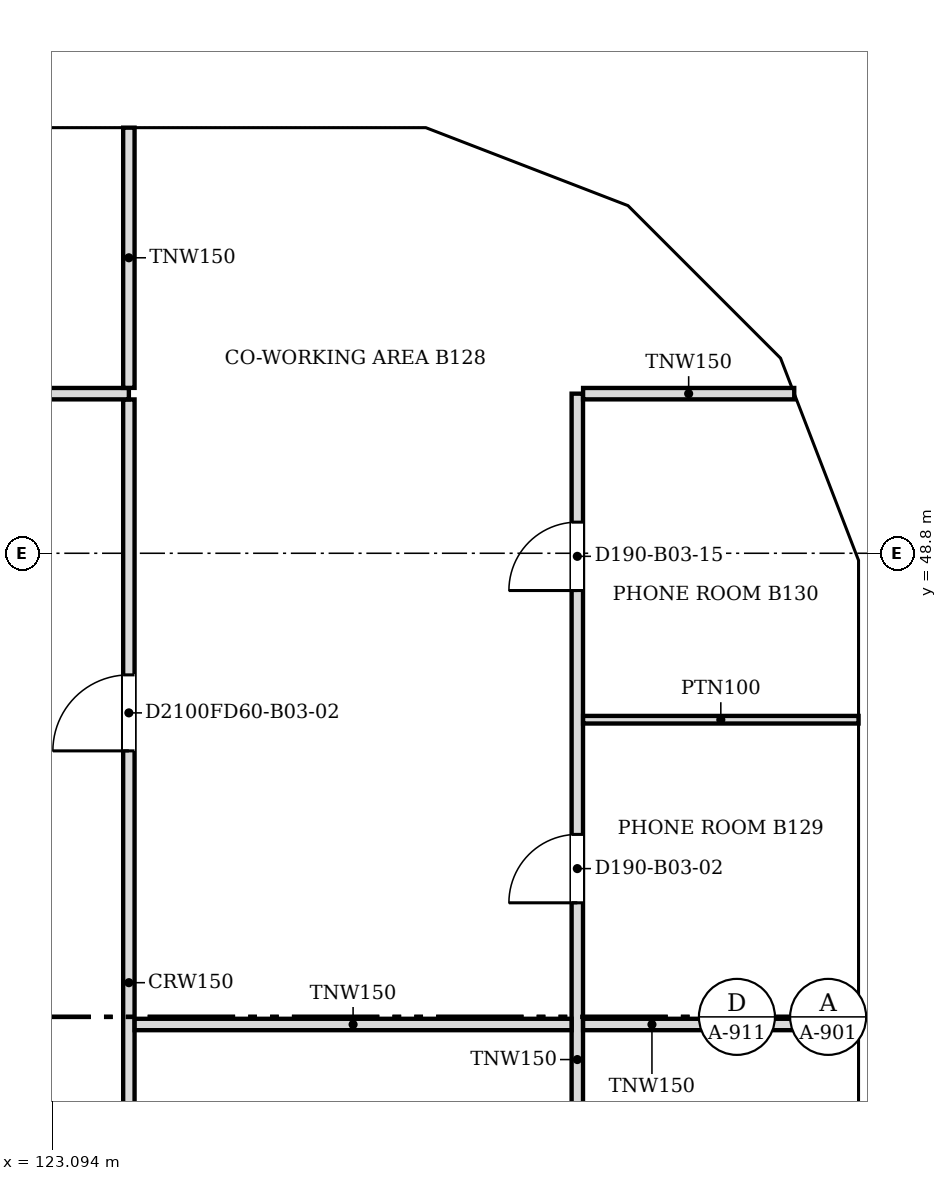
"""IFC4 building model, lengths in metres.
Left out: names, types, materials, properties, quantities, classifications, styles, units other than length and angle.
Written with IfcOpenShell. Run it as: python <this file> out.ifc"""

import sys

from ifc_helpers import new_model, si_unit, direction, frame, frame_2d, origin, place, context, subcontext, project, spatial, polyline, rectangle, outline, extrude, faceted_brep, source, transform, mapped, element, fill, save


model = new_model("IFC4")
c1 = context("Model", 3, precision=1e-05, world=origin(), true_north=direction((0.0, 1.0)))
c2 = subcontext(c1, "Body", "Model", "MODEL_VIEW")
j1 = project(units=[si_unit("LENGTHUNIT", "METRE"), si_unit("PLANEANGLEUNIT", "RADIAN")], contexts=[c1])
p1 = place(None, origin())
s1 = spatial("IfcSite", under=j1, at=p1, CompositionType="ELEMENT")
p2 = place(p1, origin())
s2 = spatial("IfcBuilding", under=s1, at=p2, CompositionType="ELEMENT")
p3 = place(p2, frame((0.0, 0.0, 25.8)))
s3 = spatial("IfcBuildingStorey", under=s2, at=p3, CompositionType="ELEMENT", Elevation=25.8)
m1 = source(origin(), c2, "Body", "Brep", [
    faceted_brep([(6.1, -0.25, 0.0), (3.05, -0.25, 3.8), (0.0, -0.25, 0.0), (6.1, -0.25, 0.0), (0.0, 0.25, 0.0), (3.05, 0.25, 3.8), (6.1, 0.25, 0.0), (6.1, 0.25, 0.0)], [[[0, 1, 2, 3]], [[4, 5, 6, 7]], [[6, 5, 1, 0]], [[5, 4, 2, 1]], [[4, 7, 3, 2]], [[3, 7, 6, 0]]]),
])
p4 = place(p3, frame((133.95, 36.6, 0.0), z_axis=(0.0, 0.0, 1.0), x_axis=(0.0, 1.0, 0.0)))
e1 = element("IfcWall", 1, at=p4, inside=s3, PredefinedType="SOLIDWALL", context=c2, shape_type="MappedRepresentation", body=[
    mapped(m1, transform((0.0, 0.0, 0.0), scale=1.0)),
])
m2 = source(origin(), c2, "Body", "SweptSolid", [
    extrude(outline(polyline([(5.579, 0.25), (3.05, 3.401), (0.521, 0.25), (5.579, 0.25)])), frame((0.0, 0.26, 0.0), z_axis=(0.0, -1.0, 0.0), x_axis=(1.0, 0.0, 0.0)), (0.0, 0.0, 1.0), 0.52),
])
p5 = place(p4, origin())
e2 = element("IfcOpeningElement", 2, at=p5, cuts=e1, PredefinedType="OPENING", context=c2, shape_type="MappedRepresentation", body=[
    mapped(m2, transform((0.0, 0.0, 0.0), scale=1.0)),
])
m3 = source(origin(), c2, "Body", "Brep", [
    faceted_brep([(6.053, -0.25, 0.0), (3.05, -0.25, 3.8), (0.0, -0.25, 0.0), (0.0, 0.25, 0.0), (3.05, 0.25, 3.8), (6.007, 0.25, 0.059), (6.007, 0.25, 0.0), (6.053, 0.0, 0.0)], [[[0, 1, 2]], [[3, 4, 5, 6]], [[5, 4, 1, 0, 7]], [[4, 3, 2, 1]], [[3, 6, 7, 0, 2]], [[7, 6, 5]]]),
])
p6 = place(p3, frame((133.95, 42.7, 0.0), z_axis=(0.0, 0.0, 1.0), x_axis=(0.0, 1.0, 0.0)))
e3 = element("IfcWall", 3, at=p6, inside=s3, PredefinedType="SOLIDWALL", context=c2, shape_type="MappedRepresentation", body=[
    mapped(m3, transform((0.0, 0.0, 0.0), scale=1.0)),
])
m4 = source(origin(), c2, "Body", "SweptSolid", [
    extrude(outline(polyline([(5.537, 0.25), (3.049, 3.399), (0.521, 0.25), (5.537, 0.25)])), frame((0.0, 0.26, 0.0), z_axis=(0.0, -1.0, 0.0), x_axis=(1.0, 0.0, 0.0)), (0.0, 0.0, 1.0), 0.52),
])
p7 = place(p6, origin())
e4 = element("IfcOpeningElement", 4, at=p7, cuts=e3, PredefinedType="OPENING", context=c2, shape_type="MappedRepresentation", body=[
    mapped(m4, transform((0.0, 0.0, 0.0), scale=1.0)),
])
m5 = source(origin(), c2, "Body", "Brep", [
    faceted_brep([(3.003, -0.25, 3.732), (2.95, -0.25, 3.8), (0.0, -0.25, 0.0), (3.003, -0.25, 0.0), (0.047, 0.25, 0.06), (2.898, 0.25, 3.732), (2.898, 0.25, 0.0), (0.047, 0.25, 0.0), (2.95, 0.0, 3.8), (0.0, 0.0, 0.0)], [[[0, 1, 2, 3]], [[4, 5, 6, 7]], [[8, 1, 0]], [[5, 4, 9, 2, 1, 8]], [[7, 6, 3, 2, 9]], [[7, 9, 4]], [[3, 6, 5, 8, 0]]]),
])
p8 = place(p3, frame((133.95, 48.753, 0.0), z_axis=(0.0, 0.0, 1.0), x_axis=(-0.359855894603, 0.933007896601, 0.0)))
e5 = element("IfcWall", 5, at=p8, inside=s3, PredefinedType="SOLIDWALL", context=c2, shape_type="MappedRepresentation", body=[
    mapped(m5, transform((0.0, 0.0, 0.0), scale=1.0)),
])
m6 = source(origin(), c2, "Body", "SweptSolid", [
    extrude(outline(polyline([(2.75, 3.135), (0.511, 0.25), (2.75, 0.25), (2.75, 3.135)])), frame((0.0, 0.26, 0.0), z_axis=(0.0, -1.0, 0.0), x_axis=(1.0, 0.0, 0.0)), (0.0, 0.0, 1.0), 0.52),
])
p9 = place(p8, origin())
e6 = element("IfcOpeningElement", 6, at=p9, cuts=e5, PredefinedType="OPENING", context=c2, shape_type="MappedRepresentation", body=[
    mapped(m6, transform((0.0, 0.0, 0.0), scale=1.0)),
])
m7 = source(origin(), c2, "Body", "Brep", [
    faceted_brep([(2.997, -0.25, 0.0), (0.053, -0.25, 3.8), (0.0, -0.25, 3.732), (0.0, -0.25, 0.0), (0.106, 0.25, 3.732), (2.944, 0.25, 0.068), (2.944, 0.25, 0.0), (0.106, 0.25, 0.0), (0.053, 0.0, 3.8), (2.997, 0.0, 0.0)], [[[0, 1, 2, 3]], [[4, 5, 6, 7]], [[5, 4, 8, 1, 0, 9]], [[2, 1, 8]], [[7, 6, 9, 0, 3]], [[7, 3, 2, 8, 4]], [[9, 6, 5]]]),
])
p10 = place(p3, frame((132.926, 51.469, 0.0), z_axis=(0.0, 0.0, 1.0), x_axis=(-0.707066050402, 0.707147509625, 0.0)))
e7 = element("IfcWall", 7, at=p10, inside=s3, PredefinedType="SOLIDWALL", context=c2, shape_type="MappedRepresentation", body=[
    mapped(m7, transform((0.0, 0.0, 0.0), scale=1.0)),
])
m8 = source(origin(), c2, "Body", "SweptSolid", [
    extrude(outline(polyline([(2.487, 0.25), (0.253, 3.134), (0.253, 0.25), (2.487, 0.25)])), frame((0.0, 0.26, 0.0), z_axis=(0.0, -1.0, 0.0), x_axis=(1.0, 0.0, 0.0)), (0.0, 0.0, 1.0), 0.52),
])
p11 = place(p10, origin())
e8 = element("IfcOpeningElement", 8, at=p11, cuts=e7, PredefinedType="OPENING", context=c2, shape_type="MappedRepresentation", body=[
    mapped(m8, transform((0.0, 0.0, 0.0), scale=1.0)),
])
m9 = source(origin(), c2, "Body", "Brep", [
    faceted_brep([(2.997, -0.25, 3.741), (2.95, -0.25, 3.8), (0.0, -0.25, 0.0), (2.997, -0.25, 0.0), (0.053, 0.25, 0.068), (2.904, 0.25, 3.74), (2.904, 0.25, 0.0), (0.053, 0.25, 0.0), (2.95, 0.0, 3.8), (0.0, 0.0, 0.0)], [[[0, 1, 2, 3]], [[4, 5, 6, 7]], [[8, 1, 0]], [[5, 4, 9, 2, 1, 8]], [[7, 6, 3, 2, 9]], [[7, 9, 4]], [[3, 6, 5, 8, 0]]]),
])
p12 = place(p3, frame((130.806, 53.588, 0.0), z_axis=(0.0, 0.0, 1.0), x_axis=(-0.932990326376, 0.359901446078, 0.0)))
e9 = element("IfcWall", 9, at=p12, inside=s3, PredefinedType="SOLIDWALL", context=c2, shape_type="MappedRepresentation", body=[
    mapped(m9, transform((0.0, 0.0, 0.0), scale=1.0)),
])
p13 = place(p12, origin())
e10 = element("IfcOpeningElement", 10, at=p13, cuts=e9, PredefinedType="OPENING", context=c2, shape_type="MappedRepresentation", body=[
    mapped(m6, transform((0.0, 0.0, 0.0), scale=1.0)),
])
m10 = source(origin(), c2, "Body", "Brep", [
    faceted_brep([(3.05, -0.25, 0.0), (0.047, -0.25, 3.8), (0.0, -0.25, 3.74), (0.0, -0.25, 0.0), (0.093, 0.25, 3.741), (3.05, 0.25, 0.0), (0.093, 0.25, 0.0), (0.047, 0.0, 3.8)], [[[0, 1, 2, 3]], [[4, 5, 6]], [[5, 4, 7, 1, 0]], [[2, 1, 7]], [[6, 5, 0, 3]], [[6, 3, 2, 7, 4]]]),
])
p14 = place(p3, frame((128.1, 54.65, 0.0), z_axis=(0.0, 0.0, 1.0), x_axis=(-1.0, 0.0, 0.0)))
e11 = element("IfcWall", 11, at=p14, inside=s3, PredefinedType="SOLIDWALL", context=c2, shape_type="MappedRepresentation", body=[
    mapped(m10, transform((0.0, 0.0, 0.0), scale=1.0)),
])
m11 = source(origin(), c2, "Body", "SweptSolid", [
    extrude(outline(polyline([(2.534, 0.25), (0.247, 3.144), (0.247, 0.25), (2.534, 0.25)])), frame((0.0, 0.26, 0.0), z_axis=(0.0, -1.0, 0.0), x_axis=(1.0, 0.0, 0.0)), (0.0, 0.0, 1.0), 0.52),
])
p15 = place(p14, origin())
e12 = element("IfcOpeningElement", 12, at=p15, cuts=e11, PredefinedType="OPENING", context=c2, shape_type="MappedRepresentation", body=[
    mapped(m11, transform((0.0, 0.0, 0.0), scale=1.0)),
])
m12 = source(origin(), c2, "Body", "SweptSolid", [
    extrude(outline(polyline([(6.1, 0.0), (3.05, 3.8), (0.0, 0.0), (6.1, 0.0)])), frame((0.0, 0.25, 0.0), z_axis=(0.0, -1.0, 0.0), x_axis=(1.0, 0.0, 0.0)), (0.0, 0.0, 1.0), 0.5),
])
p16 = place(p3, frame((125.05, 54.65, 0.0), z_axis=(0.0, 0.0, 1.0), x_axis=(-1.0, 0.0, 0.0)))
e13 = element("IfcWall", 13, at=p16, inside=s3, PredefinedType="SOLIDWALL", context=c2, shape_type="MappedRepresentation", body=[
    mapped(m12, transform((0.0, 0.0, 0.0), scale=1.0)),
])
p17 = place(p16, origin())
e14 = element("IfcOpeningElement", 14, at=p17, cuts=e13, PredefinedType="OPENING", context=c2, shape_type="MappedRepresentation", body=[
    mapped(m2, transform((0.0, 0.0, 0.0), scale=1.0)),
])
p18 = place(p2, frame((0.0, 0.0, 29.6)))
s4 = spatial("IfcBuildingStorey", under=s2, at=p18, CompositionType="ELEMENT", Elevation=29.6)
m13 = source(origin(), c2, "Body", "SweptSolid", [
    extrude(outline(polyline([(3.05, 0.0), (6.1, 3.8), (3.05, 7.6), (0.0, 3.8), (3.05, 0.0)])), frame((0.0, 0.25, 0.0), z_axis=(0.0, -1.0, 0.0), x_axis=(1.0, 0.0, 0.0)), (0.0, 0.0, 1.0), 0.5),
])
p19 = place(p18, frame((133.95, 39.65, -3.8), z_axis=(0.0, 0.0, 1.0), x_axis=(0.0, 1.0, 0.0)))
e15 = element("IfcWall", 15, at=p19, inside=s4, PredefinedType="SOLIDWALL", context=c2, shape_type="MappedRepresentation", body=[
    mapped(m13, transform((0.0, 0.0, 0.0), scale=1.0)),
])
m14 = source(origin(), c2, "Body", "SweptSolid", [
    extrude(outline(polyline([(3.05, 0.399), (5.78, 3.8), (3.05, 7.2), (0.321, 3.8), (3.05, 0.399)])), frame((0.0, 0.26, 0.0), z_axis=(0.0, -1.0, 0.0), x_axis=(1.0, 0.0, 0.0)), (0.0, 0.0, 1.0), 0.52),
])
p20 = place(p19, origin())
e16 = element("IfcOpeningElement", 16, at=p20, cuts=e15, PredefinedType="OPENING", context=c2, shape_type="MappedRepresentation", body=[
    mapped(m14, transform((0.0, 0.0, 0.0), scale=1.0)),
])
m15 = source(origin(), c2, "Body", "Brep", [
    faceted_brep([(3.003, -0.25, 0.0), (3.05, -0.25, 0.06), (3.05, -0.25, 7.54), (3.003, -0.25, 7.6), (0.0, -0.25, 3.8), (0.0, 0.25, 3.8), (2.957, 0.25, 7.541), (2.957, 0.25, 0.059), (3.003, 0.0, 0.0), (3.003, 0.0, 7.6)], [[[0, 1, 2, 3, 4]], [[5, 6, 7]], [[1, 0, 8]], [[9, 3, 2]], [[6, 5, 4, 3, 9]], [[5, 7, 8, 0, 4]], [[1, 8, 7, 6, 9, 2]]]),
])
p21 = place(p18, frame((133.95, 45.75, -3.8), z_axis=(0.0, 0.0, 1.0), x_axis=(0.0, 1.0, 0.0)))
e17 = element("IfcWall", 17, at=p21, inside=s4, PredefinedType="SOLIDWALL", context=c2, shape_type="MappedRepresentation", body=[
    mapped(m15, transform((0.0, 0.0, 0.0), scale=1.0)),
])
m16 = source(origin(), c2, "Body", "SweptSolid", [
    extrude(outline(polyline([(2.803, 6.944), (0.319, 3.8), (2.803, 0.656), (2.803, 6.944)])), frame((0.0, 0.26, 0.0), z_axis=(0.0, -1.0, 0.0), x_axis=(1.0, 0.0, 0.0)), (0.0, 0.0, 1.0), 0.52),
])
p22 = place(p21, origin())
e18 = element("IfcOpeningElement", 18, at=p22, cuts=e17, PredefinedType="OPENING", context=c2, shape_type="MappedRepresentation", body=[
    mapped(m16, transform((0.0, 0.0, 0.0), scale=1.0)),
])
m17 = source(origin(), c2, "Body", "Brep", [
    faceted_brep([(0.047, -0.25, 0.0), (2.997, -0.25, 3.8), (0.047, -0.25, 7.6), (0.0, -0.25, 7.541), (0.0, -0.25, 0.059), (0.093, 0.25, 7.54), (2.944, 0.25, 3.868), (2.944, 0.25, 3.732), (0.093, 0.25, 0.06), (2.997, 0.0, 3.8), (0.047, 0.0, 0.0), (0.047, 0.0, 7.6)], [[[0, 1, 2, 3, 4]], [[5, 6, 7, 8]], [[8, 7, 9, 1, 0, 10]], [[6, 5, 11, 2, 1, 9]], [[3, 2, 11]], [[10, 0, 4]], [[8, 10, 4, 3, 11, 5]], [[7, 6, 9]]]),
])
p23 = place(p18, frame((133.967, 48.71, -3.8), z_axis=(0.0, 0.0, 1.0), x_axis=(-0.359901446078, 0.932990326376, 0.0)))
e19 = element("IfcWall", 19, at=p23, inside=s4, PredefinedType="SOLIDWALL", context=c2, shape_type="MappedRepresentation", body=[
    mapped(m17, transform((0.0, 0.0, 0.0), scale=1.0)),
])
m18 = source(origin(), c2, "Body", "SweptSolid", [
    extrude(outline(polyline([(0.247, 0.665), (2.681, 3.8), (0.247, 6.935), (0.247, 0.665)])), frame((0.0, 0.26, 0.0), z_axis=(0.0, -1.0, 0.0), x_axis=(1.0, 0.0, 0.0)), (0.0, 0.0, 1.0), 0.52),
])
p24 = place(p23, origin())
e20 = element("IfcOpeningElement", 20, at=p24, cuts=e19, PredefinedType="OPENING", context=c2, shape_type="MappedRepresentation", body=[
    mapped(m18, transform((0.0, 0.0, 0.0), scale=1.0)),
])
m19 = source(origin(), c2, "Body", "Brep", [
    faceted_brep([(2.944, -0.25, 0.0), (2.997, -0.25, 0.068), (2.997, -0.25, 7.532), (2.944, -0.25, 7.6), (0.0, -0.25, 3.8), (0.053, 0.25, 3.868), (2.891, 0.25, 7.532), (2.891, 0.25, 0.068), (0.053, 0.25, 3.732), (2.944, 0.0, 0.0), (2.944, 0.0, 7.6), (0.0, 0.0, 3.8)], [[[0, 1, 2, 3, 4]], [[5, 6, 7, 8]], [[1, 0, 9]], [[10, 3, 2]], [[6, 5, 11, 4, 3, 10]], [[8, 7, 9, 0, 4, 11]], [[8, 11, 5]], [[1, 9, 7, 6, 10, 2]]]),
])
p25 = place(p18, frame((132.888, 51.506, -3.8), z_axis=(0.0, 0.0, 1.0), x_axis=(-0.707147509625, 0.707066050402, 0.0)))
e21 = element("IfcWall", 21, at=p25, inside=s4, PredefinedType="SOLIDWALL", context=c2, shape_type="MappedRepresentation", body=[
    mapped(m19, transform((0.0, 0.0, 0.0), scale=1.0)),
])
m20 = source(origin(), c2, "Body", "SweptSolid", [
    extrude(outline(polyline([(2.744, 6.934), (0.316, 3.8), (2.744, 0.666), (2.744, 6.934)])), frame((0.0, 0.26, 0.0), z_axis=(0.0, -1.0, 0.0), x_axis=(1.0, 0.0, 0.0)), (0.0, 0.0, 1.0), 0.52),
])
p26 = place(p25, origin())
e22 = element("IfcOpeningElement", 22, at=p26, cuts=e21, PredefinedType="OPENING", context=c2, shape_type="MappedRepresentation", body=[
    mapped(m20, transform((0.0, 0.0, 0.0), scale=1.0)),
])
m21 = source(origin(), c2, "Body", "Brep", [
    faceted_brep([(0.053, -0.25, 0.0), (3.003, -0.25, 3.8), (0.053, -0.25, 7.6), (0.0, -0.25, 7.531), (0.0, -0.25, 0.068), (0.106, 0.25, 7.532), (2.957, 0.25, 3.86), (2.957, 0.25, 3.74), (0.106, 0.25, 0.068), (3.003, 0.0, 3.8), (0.053, 0.0, 0.0), (0.053, 0.0, 7.6)], [[[0, 1, 2, 3, 4]], [[5, 6, 7, 8]], [[8, 7, 9, 1, 0, 10]], [[6, 5, 11, 2, 1, 9]], [[3, 2, 11]], [[10, 0, 4]], [[8, 10, 4, 3, 11, 5]], [[7, 6, 9]]]),
])
p27 = place(p18, frame((130.856, 53.569, -3.8), z_axis=(0.0, 0.0, 1.0), x_axis=(-0.933007896601, 0.359855894603, 0.0)))
e23 = element("IfcWall", 23, at=p27, inside=s4, PredefinedType="SOLIDWALL", context=c2, shape_type="MappedRepresentation", body=[
    mapped(m21, transform((0.0, 0.0, 0.0), scale=1.0)),
])
m22 = source(origin(), c2, "Body", "SweptSolid", [
    extrude(outline(polyline([(0.253, 0.665), (2.687, 3.8), (0.253, 6.935), (0.253, 0.665)])), frame((0.0, 0.26, 0.0), z_axis=(0.0, -1.0, 0.0), x_axis=(1.0, 0.0, 0.0)), (0.0, 0.0, 1.0), 0.52),
])
p28 = place(p27, origin())
e24 = element("IfcOpeningElement", 24, at=p28, cuts=e23, PredefinedType="OPENING", context=c2, shape_type="MappedRepresentation", body=[
    mapped(m22, transform((0.0, 0.0, 0.0), scale=1.0)),
])
m23 = source(origin(), c2, "Body", "Brep", [
    faceted_brep([(3.003, -0.25, 0.0), (6.053, -0.25, 3.8), (3.003, -0.25, 7.6), (0.0, -0.25, 3.8), (0.047, 0.25, 3.859), (3.003, 0.25, 7.6), (6.053, 0.25, 3.8), (3.003, 0.25, 0.0), (0.047, 0.25, 3.741), (0.0, 0.0, 3.8)], [[[0, 1, 2, 3]], [[4, 5, 6, 7, 8]], [[7, 6, 1, 0]], [[6, 5, 2, 1]], [[5, 4, 9, 3, 2]], [[8, 7, 0, 3, 9]], [[8, 9, 4]]]),
])
p29 = place(p18, frame((128.053, 54.65, -3.8), z_axis=(0.0, 0.0, 1.0), x_axis=(-1.0, 0.0, 0.0)))
e25 = element("IfcWall", 25, at=p29, inside=s4, PredefinedType="SOLIDWALL", context=c2, shape_type="MappedRepresentation", body=[
    mapped(m23, transform((0.0, 0.0, 0.0), scale=1.0)),
])
m24 = source(origin(), c2, "Body", "SweptSolid", [
    extrude(outline(polyline([(3.005, 0.401), (5.733, 3.8), (3.005, 7.199), (0.319, 3.8), (3.005, 0.401)])), frame((0.0, 0.26, 0.0), z_axis=(0.0, -1.0, 0.0), x_axis=(1.0, 0.0, 0.0)), (0.0, 0.0, 1.0), 0.52),
])
p30 = place(p29, origin())
e26 = element("IfcOpeningElement", 26, at=p30, cuts=e25, PredefinedType="OPENING", context=c2, shape_type="MappedRepresentation", body=[
    mapped(m24, transform((0.0, 0.0, 0.0), scale=1.0)),
])
p31 = place(p3, frame((124.1, 50.824, 0.0), z_axis=(0.0, 0.0, 1.0), x_axis=(0.0, -1.0, 0.0)))
e27 = element("IfcWall", 27, at=p31, inside=s3, PredefinedType="PARTITIONING", context=c2, shape_type="SweptSolid", body=[
    extrude(rectangle(XDim=14.224, YDim=0.15, at=frame_2d((7.112, 0.0))), origin(), (0.0, 0.0, 1.0), 3.067),
])
m25 = source(origin(), c2, "Body", "SweptSolid", [
    extrude(rectangle(XDim=1.0, YDim=2.1, at=frame_2d((0.5, 1.05))), frame((0.0, 0.085, 0.0), z_axis=(0.0, -1.0, 0.0), x_axis=(1.0, 0.0, 0.0)), (0.0, 0.0, 1.0), 0.17),
])
p32 = place(p31, frame((3.624, 0.0, 0.0)))
e28 = element("IfcOpeningElement", 28, at=p32, cuts=e27, PredefinedType="OPENING", context=c2, shape_type="MappedRepresentation", body=[
    mapped(m25, transform((0.0, 0.0, 0.0), scale=1.0)),
])
p33 = place(p31, frame((10.724, 0.0, 0.0)))
e29 = element("IfcOpeningElement", 29, at=p33, cuts=e27, PredefinedType="OPENING", context=c2, shape_type="MappedRepresentation", body=[
    mapped(m25, transform((0.0, 0.0, 0.0), scale=1.0)),
])
p34 = place(p3, frame((130.0, 50.9, 0.0), z_axis=(0.0, 0.0, 1.0), x_axis=(0.0, -1.0, 0.0)))
e30 = element("IfcWall", 30, at=p34, inside=s3, PredefinedType="PARTITIONING", context=c2, shape_type="SweptSolid", body=[
    extrude(rectangle(XDim=14.224, YDim=0.15, at=frame_2d((7.112, 0.0))), origin(), (0.0, 0.0, 1.0), 3.067),
])
m26 = source(origin(), c2, "Body", "SweptSolid", [
    extrude(rectangle(XDim=0.9, YDim=2.1, at=frame_2d((0.45, 1.05))), frame((0.0, 0.085, 0.0), z_axis=(0.0, -1.0, 0.0), x_axis=(1.0, 0.0, 0.0)), (0.0, 0.0, 1.0), 0.17),
])
p35 = place(p34, frame((5.799, 0.0, 0.0)))
e31 = element("IfcOpeningElement", 31, at=p35, cuts=e30, PredefinedType="OPENING", context=c2, shape_type="MappedRepresentation", body=[
    mapped(m26, transform((0.0, 0.0, 0.0), scale=1.0)),
])
p36 = place(p34, frame((10.824, 0.0, 0.0)))
e32 = element("IfcOpeningElement", 32, at=p36, cuts=e30, PredefinedType="OPENING", context=c2, shape_type="MappedRepresentation", body=[
    mapped(m26, transform((0.0, 0.0, 0.0), scale=1.0)),
])
p37 = place(p34, frame((1.69, 0.0, 0.0)))
e33 = element("IfcOpeningElement", 33, at=p37, cuts=e30, PredefinedType="OPENING", context=c2, shape_type="MappedRepresentation", body=[
    mapped(m26, transform((0.0, 0.0, 0.0), scale=1.0)),
])
p38 = place(p3, frame((124.176, 42.6, 0.0), z_axis=(0.0, 0.0, 1.0), x_axis=(1.0, 0.0, 0.0)))
e34 = element("IfcWall", 34, at=p38, inside=s3, PredefinedType="PARTITIONING", context=c2, shape_type="SweptSolid", body=[
    extrude(rectangle(XDim=5.748, YDim=0.15, at=frame_2d((2.874, 0.0))), origin(), (0.0, 0.0, 1.0), 3.067),
])
p39 = place(p3, frame((130.076, 42.6, 0.0), z_axis=(0.0, 0.0, 1.0), x_axis=(1.0, 0.0, 0.0)))
e35 = element("IfcWall", 35, at=p39, inside=s3, PredefinedType="PARTITIONING", context=c2, shape_type="SweptSolid", body=[
    extrude(rectangle(XDim=3.624, YDim=0.15, at=frame_2d((1.812, 0.0))), origin(), (0.0, 0.0, 1.0), 3.067),
])
p40 = place(p3, frame((130.076, 46.61, 0.0), z_axis=(0.0, 0.0, 1.0), x_axis=(1.0, 0.0, 0.0)))
e36 = element("IfcWall", 36, at=p40, inside=s3, PredefinedType="PARTITIONING", context=c2, shape_type="SweptSolid", body=[
    extrude(rectangle(XDim=3.624, YDim=0.1, at=frame_2d((1.812, 0.0))), origin(), (0.0, 0.0, 1.0), 3.067),
])
p41 = place(p3, frame((108.5, 50.9, 0.0), z_axis=(0.0, 0.0, 1.0), x_axis=(1.0, 0.0, 0.0)))
e37 = element("IfcWall", 37, at=p41, inside=s3, PredefinedType="PARTITIONING", context=c2, shape_type="SweptSolid", body=[
    extrude(rectangle(XDim=15.6, YDim=0.15, at=frame_2d((7.8, 0.0))), origin(), (0.0, 0.0, 1.0), 3.067),
])
p42 = place(p41, frame((7.3, 0.0, 0.0)))
e38 = element("IfcOpeningElement", 38, at=p42, cuts=e37, PredefinedType="OPENING", context=c2, shape_type="MappedRepresentation", body=[
    mapped(m25, transform((0.0, 0.0, 0.0), scale=1.0)),
])
p43 = place(p3, frame((130.076, 50.9, 0.0), z_axis=(0.0, 0.0, 1.0), x_axis=(1.0, 0.0, 0.0)))
e39 = element("IfcWall", 39, at=p43, inside=s3, PredefinedType="PARTITIONING", context=c2, shape_type="SweptSolid", body=[
    extrude(rectangle(XDim=2.778, YDim=0.15, at=frame_2d((1.389, 0.0))), origin(), (0.0, 0.0, 1.0), 3.067),
])
p44 = place(p3, frame((124.1, 50.976, 0.0), z_axis=(0.0, 0.0, 1.0), x_axis=(0.0, 1.0, 0.0)))
e40 = element("IfcWall", 40, at=p44, inside=s3, PredefinedType="PARTITIONING", context=c2, shape_type="SweptSolid", body=[
    extrude(rectangle(XDim=3.424, YDim=0.15, at=frame_2d((1.712, 0.0))), origin(), (0.0, 0.0, 1.0), 3.067),
])
m27 = source(origin(), c2, "Body", "SweptSolid", [
    extrude(rectangle(XDim=0.9, YDim=2.1, at=frame_2d((0.45, 1.05))), frame((0.0, 0.025, 0.0), z_axis=(0.0, -1.0, 0.0), x_axis=(1.0, 0.0, 0.0)), (0.0, 0.0, 1.0), 0.05),
])
p45 = place(p35, origin())
e41 = element("IfcDoor", 41, at=p45, inside=s3, OperationType="SINGLE_SWING_RIGHT", PredefinedType="DOOR", context=c2, shape_type="MappedRepresentation", body=[
    mapped(m27, transform((0.0, 0.0, 0.0), scale=1.0)),
])
fill(e31, e41)
p46 = place(p37, origin())
e42 = element("IfcDoor", 42, at=p46, inside=s3, OperationType="SINGLE_SWING_RIGHT", PredefinedType="DOOR", context=c2, shape_type="MappedRepresentation", body=[
    mapped(m27, transform((0.0, 0.0, 0.0), scale=1.0)),
])
fill(e33, e42)
m28 = source(origin(), c2, "Body", "SweptSolid", [
    extrude(rectangle(XDim=1.0, YDim=2.1, at=frame_2d((0.5, 1.05))), frame((0.0, 0.025, 0.0), z_axis=(0.0, -1.0, 0.0), x_axis=(1.0, 0.0, 0.0)), (0.0, 0.0, 1.0), 0.05),
])
p47 = place(p32, origin())
e43 = element("IfcDoor", 43, at=p47, inside=s3, OperationType="SINGLE_SWING_RIGHT", PredefinedType="DOOR", context=c2, shape_type="MappedRepresentation", body=[
    mapped(m28, transform((0.0, 0.0, 0.0), scale=1.0)),
])
fill(e28, e43)
save(model, sys.argv[1])
